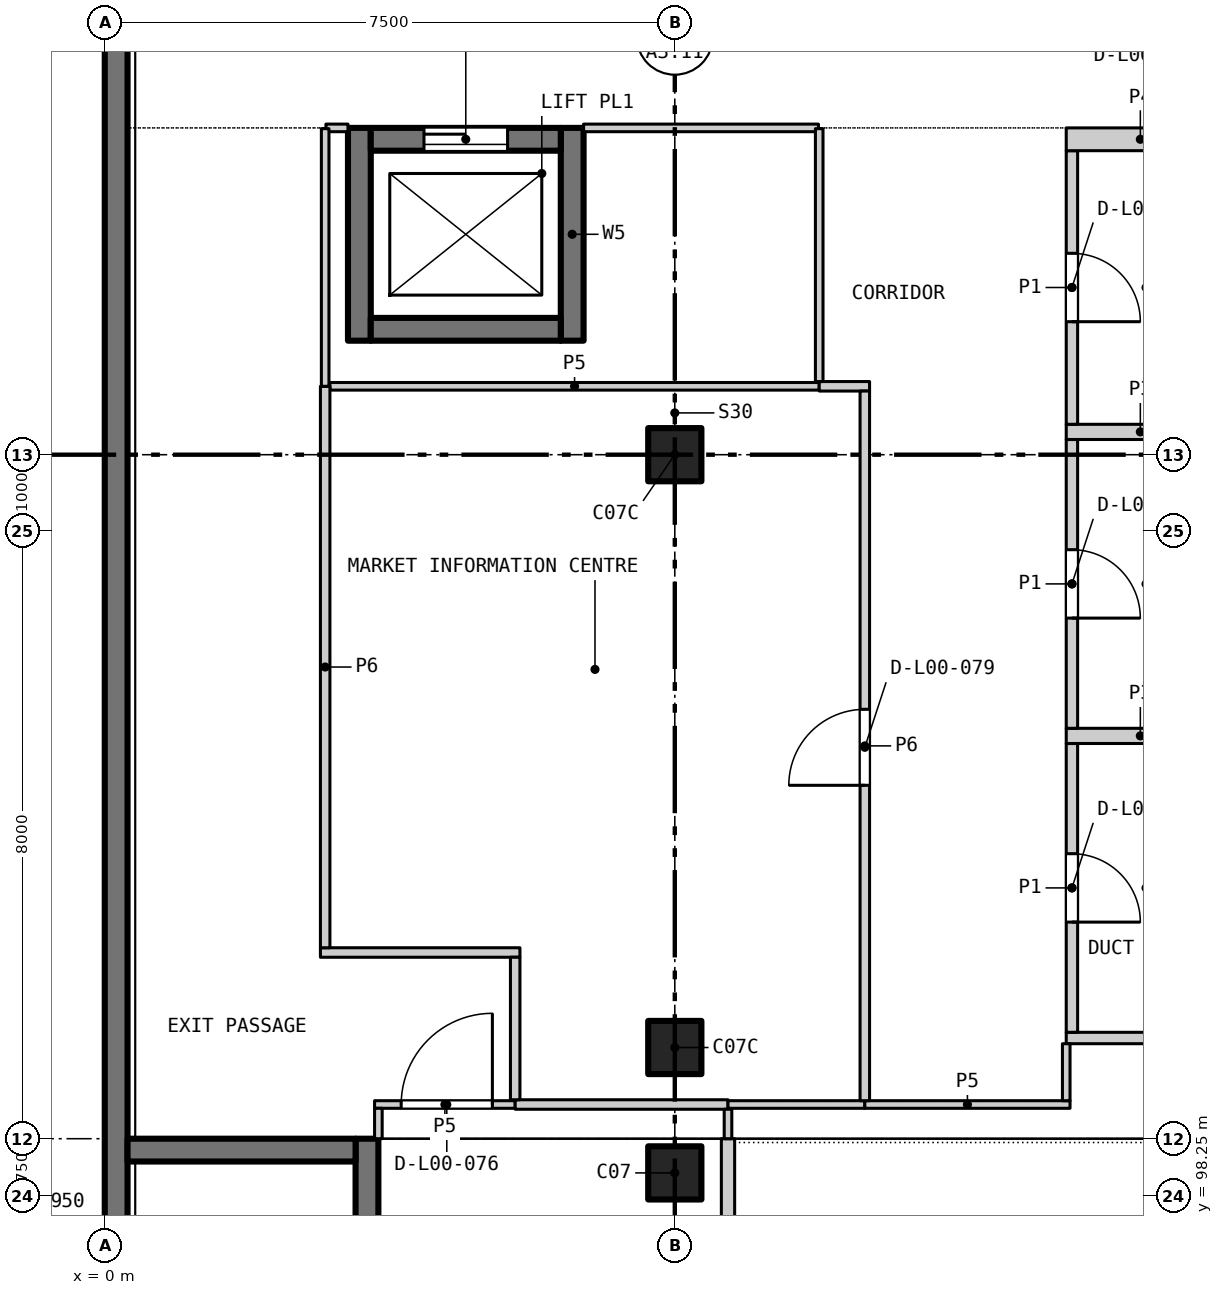
"""IFC4 building model, lengths in metres.
Left out: names, types, materials, properties, quantities, classifications, styles, units other than length and angle.
Written with IfcOpenShell. Run it as: python <this file> out.ifc"""

import sys

from ifc_helpers import new_model, si_unit, direction, frame, frame_2d, origin, origin_2d, place, context, subcontext, project, spatial, rectangle, extrude, element, fill, save


model = new_model("IFC4")
c1 = context("Model", 3, precision=1e-05, world=origin(), true_north=direction((0.0, 1.0)))
c2 = subcontext(c1, "Body", "Model", "MODEL_VIEW")
j1 = project(units=[si_unit("LENGTHUNIT", "METRE"), si_unit("PLANEANGLEUNIT", "RADIAN")], contexts=[c1])
p1 = place(None, origin())
s1 = spatial("IfcSite", under=j1, at=p1, CompositionType="ELEMENT")
p2 = place(p1, origin())
s2 = spatial("IfcBuilding", under=s1, at=p2, CompositionType="ELEMENT")
p3 = place(p2, origin())
s3 = spatial("IfcBuildingStorey", under=s2, at=p3, CompositionType="ELEMENT", Elevation=0.0)
for number, where, z_axis, x_axis in (
    (1, (7.5, 98.55, 0.0), (0.0, 0.0, 1.0), (1.0, 0.0, 0.0)),
    (2, (7.5, 100.2, 0.0), (0.0, 0.0, 1.0), (1.0, 0.0, 0.0)),
    (3, (7.5, 108.0, 0.0), (0.0, 0.0, 1.0), (1.0, 0.0, 0.0)),
):
    element("IfcColumn", number, at=place(p3, frame(where, z_axis=z_axis, x_axis=x_axis)), inside=s3, PredefinedType="COLUMN", context=c2, shape_type="SweptSolid", body=[
        extrude(rectangle(XDim=0.7, YDim=0.7, at=origin_2d()), origin(), (0.0, 0.0, 1.0), 6.0),
    ])
p4 = place(p3, frame((0.15, 18.0, 0.0), z_axis=(0.0, 0.0, 1.0), x_axis=(0.0, 1.0, 0.0)))
e4 = element("IfcWall", 4, at=p4, inside=s3, PredefinedType="SHEAR", context=c2, shape_type="SweptSolid", body=[
    extrude(rectangle(XDim=108.0, YDim=0.3, at=frame_2d((54.0, 0.0))), origin(), (0.0, 0.0, 1.0), 6.0),
])
p5 = place(p3, frame((3.45, 91.2, 0.0), z_axis=(0.0, 0.0, 1.0), x_axis=(0.0, 1.0, 0.0)))
e5 = element("IfcWall", 5, at=p5, inside=s3, PredefinedType="SHEAR", context=c2, shape_type="SweptSolid", body=[
    extrude(rectangle(XDim=7.8, YDim=0.3, at=frame_2d((3.9, 0.0))), origin(), (0.0, 0.0, 1.0), 6.0),
])
p6 = place(p5, frame((0.75, 0.0, 0.0)))
e6 = element("IfcOpeningElement", 6, at=p6, cuts=e5, PredefinedType="OPENING", context=c2, shape_type="SweptSolid", body=[
    extrude(rectangle(XDim=1.1, YDim=2.1, at=frame_2d((0.55, 1.05))), frame((0.0, 0.16, 0.0), z_axis=(0.0, -1.0, 0.0), x_axis=(1.0, 0.0, 0.0)), (0.0, 0.0, 1.0), 0.32),
])
p7 = place(p3, frame((0.3, 98.85, 0.0), z_axis=(0.0, 0.0, 1.0), x_axis=(1.0, 0.0, 0.0)))
e7 = element("IfcWall", 7, at=p7, inside=s3, PredefinedType="SHEAR", context=c2, shape_type="SweptSolid", body=[
    extrude(rectangle(XDim=3.0, YDim=0.3, at=frame_2d((1.5, 0.0))), origin(), (0.0, 0.0, 1.0), 6.0),
])
for number, where, z_axis, x_axis in (
    (8, (3.35, 109.5, 0.0), (0.0, 0.0, 1.0), (0.0, 1.0, 0.0)),
    (9, (6.15, 109.5, 0.0), (0.0, 0.0, 1.0), (0.0, 1.0, 0.0)),
):
    element("IfcWall", number, at=place(p3, frame(where, z_axis=z_axis, x_axis=x_axis)), inside=s3, PredefinedType="SHEAR", context=c2, shape_type="SweptSolid", body=[
        extrude(rectangle(XDim=2.8, YDim=0.3, at=frame_2d((1.4, 0.0))), origin(), (0.0, 0.0, 1.0), 6.0),
    ])
p8 = place(p3, frame((3.5, 109.65, 0.0), z_axis=(0.0, 0.0, 1.0), x_axis=(1.0, 0.0, 0.0)))
e10 = element("IfcWall", 10, at=p8, inside=s3, PredefinedType="SHEAR", context=c2, shape_type="SweptSolid", body=[
    extrude(rectangle(XDim=2.5, YDim=0.3, at=frame_2d((1.25, 0.0))), origin(), (0.0, 0.0, 1.0), 6.0),
])
p9 = place(p3, frame((3.5, 112.15, 0.0), z_axis=(0.0, 0.0, 1.0), x_axis=(1.0, 0.0, 0.0)))
e11 = element("IfcWall", 11, at=p9, inside=s3, PredefinedType="SHEAR", context=c2, shape_type="SweptSolid", body=[
    extrude(rectangle(XDim=2.5, YDim=0.3, at=frame_2d((1.25, 0.0))), origin(), (0.0, 0.0, 1.0), 6.0),
])
p10 = place(p9, frame((0.7, 0.0, 0.0)))
e12 = element("IfcOpeningElement", 12, at=p10, cuts=e11, PredefinedType="OPENING", context=c2, shape_type="SweptSolid", body=[
    extrude(rectangle(XDim=1.1, YDim=2.1, at=frame_2d((0.55, 1.05))), frame((0.0, 0.16, 0.0), z_axis=(0.0, -1.0, 0.0), x_axis=(1.0, 0.0, 0.0)), (0.0, 0.0, 1.0), 0.32),
])
p11 = place(p3, frame((12.65, 100.325, 0.0), z_axis=(0.0, 0.0, 1.0), x_axis=(1.0, 0.0, 0.0)))
e13 = element("IfcWall", 13, at=p11, inside=s3, PredefinedType="PARTITIONING", context=c2, shape_type="SweptSolid", body=[
    extrude(rectangle(XDim=1.95, YDim=0.15, at=frame_2d((0.975, 0.0))), origin(), (0.0, 0.0, 1.0), 5.7),
])
p12 = place(p3, frame((12.725, 100.4, 0.0), z_axis=(0.0, 0.0, 1.0), x_axis=(0.0, 1.0, 0.0)))
e14 = element("IfcWall", 14, at=p12, inside=s3, PredefinedType="PARTITIONING", context=c2, shape_type="SweptSolid", body=[
    extrude(rectangle(XDim=3.8, YDim=0.15, at=frame_2d((1.9, 0.0))), origin(), (0.0, 0.0, 1.0), 5.7),
])
p13 = place(p12, frame((1.45, 0.0, 0.0)))
e15 = element("IfcOpeningElement", 15, at=p13, cuts=e14, PredefinedType="OPENING", context=c2, shape_type="SweptSolid", body=[
    extrude(rectangle(XDim=0.9, YDim=2.1, at=frame_2d((0.45, 1.05))), frame((0.0, 0.085, 0.0), z_axis=(0.0, -1.0, 0.0), x_axis=(1.0, 0.0, 0.0)), (0.0, 0.0, 1.0), 0.17),
])
p14 = place(p3, frame((12.65, 104.3, 0.0), z_axis=(0.0, 0.0, 1.0), x_axis=(1.0, 0.0, 0.0)))
e16 = element("IfcWall", 16, at=p14, inside=s3, PredefinedType="PARTITIONING", context=c2, shape_type="SweptSolid", body=[
    extrude(rectangle(XDim=1.95, YDim=0.2, at=frame_2d((0.975, 0.0))), origin(), (0.0, 0.0, 1.0), 5.7),
])
p15 = place(p3, frame((12.725, 104.4, 0.0), z_axis=(0.0, 0.0, 1.0), x_axis=(0.0, 1.0, 0.0)))
e17 = element("IfcWall", 17, at=p15, inside=s3, PredefinedType="PARTITIONING", context=c2, shape_type="SweptSolid", body=[
    extrude(rectangle(XDim=3.8, YDim=0.15, at=frame_2d((1.9, 0.0))), origin(), (0.0, 0.0, 1.0), 5.7),
])
p16 = place(p15, frame((1.45, 0.0, 0.0)))
e18 = element("IfcOpeningElement", 18, at=p16, cuts=e17, PredefinedType="OPENING", context=c2, shape_type="SweptSolid", body=[
    extrude(rectangle(XDim=0.9, YDim=2.1, at=frame_2d((0.45, 1.05))), frame((0.0, 0.085, 0.0), z_axis=(0.0, -1.0, 0.0), x_axis=(1.0, 0.0, 0.0)), (0.0, 0.0, 1.0), 0.17),
])
p17 = place(p3, frame((12.65, 108.3, 0.0), z_axis=(0.0, 0.0, 1.0), x_axis=(1.0, 0.0, 0.0)))
e19 = element("IfcWall", 19, at=p17, inside=s3, PredefinedType="PARTITIONING", context=c2, shape_type="SweptSolid", body=[
    extrude(rectangle(XDim=1.95, YDim=0.2, at=frame_2d((0.975, 0.0))), origin(), (0.0, 0.0, 1.0), 5.7),
])
p18 = place(p3, frame((12.725, 108.4, 0.0), z_axis=(0.0, 0.0, 1.0), x_axis=(0.0, 1.0, 0.0)))
e20 = element("IfcWall", 20, at=p18, inside=s3, PredefinedType="PARTITIONING", context=c2, shape_type="SweptSolid", body=[
    extrude(rectangle(XDim=3.6, YDim=0.15, at=frame_2d((1.8, 0.0))), origin(), (0.0, 0.0, 1.0), 5.7),
])
p19 = place(p18, frame((1.35, 0.0, 0.0)))
e21 = element("IfcOpeningElement", 21, at=p19, cuts=e20, PredefinedType="OPENING", context=c2, shape_type="SweptSolid", body=[
    extrude(rectangle(XDim=0.9, YDim=2.1, at=frame_2d((0.45, 1.05))), frame((0.0, 0.085, 0.0), z_axis=(0.0, -1.0, 0.0), x_axis=(1.0, 0.0, 0.0)), (0.0, 0.0, 1.0), 0.17),
])
p20 = place(p3, frame((12.65, 112.15, 0.0), z_axis=(0.0, 0.0, 1.0), x_axis=(1.0, 0.0, 0.0)))
e22 = element("IfcWall", 22, at=p20, inside=s3, PredefinedType="PARTITIONING", context=c2, shape_type="SweptSolid", body=[
    extrude(rectangle(XDim=1.95, YDim=0.3, at=frame_2d((0.975, 0.0))), origin(), (0.0, 0.0, 1.0), 5.7),
])
p21 = place(p3, frame((3.55, 99.45, 0.0), z_axis=(0.0, 0.0, 1.0), x_axis=(1.0, 0.0, 0.0)))
e23 = element("IfcWall", 23, at=p21, inside=s3, PredefinedType="PARTITIONING", context=c2, shape_type="SweptSolid", body=[
    extrude(rectangle(XDim=1.85, YDim=0.1, at=frame_2d((0.925, 0.0))), origin(), (0.0, 0.0, 1.0), 5.7),
])
p22 = place(p21, frame((0.35, 0.0, 0.0)))
e24 = element("IfcOpeningElement", 24, at=p22, cuts=e23, PredefinedType="OPENING", context=c2, shape_type="SweptSolid", body=[
    extrude(rectangle(XDim=1.2, YDim=2.1, at=frame_2d((0.6, 1.05))), frame((0.0, 0.06, 0.0), z_axis=(0.0, -1.0, 0.0), x_axis=(1.0, 0.0, 0.0)), (0.0, 0.0, 1.0), 0.12),
])
p23 = place(p3, frame((5.4, 99.45, 0.0), z_axis=(0.0, 0.0, 1.0), x_axis=(1.0, 0.0, 0.0)))
e25 = element("IfcWall", 25, at=p23, inside=s3, PredefinedType="PARTITIONING", context=c2, shape_type="SweptSolid", body=[
    extrude(rectangle(XDim=2.8, YDim=0.125, at=frame_2d((1.4, 0.0))), origin(), (0.0, 0.0, 1.0), 5.7),
])
p24 = place(p3, frame((8.2, 99.45, 0.0), z_axis=(0.0, 0.0, 1.0), x_axis=(1.0, 0.0, 0.0)))
e26 = element("IfcWall", 26, at=p24, inside=s3, PredefinedType="PARTITIONING", context=c2, shape_type="SweptSolid", body=[
    extrude(rectangle(XDim=1.8, YDim=0.1, at=frame_2d((0.9, 0.0))), origin(), (0.0, 0.0, 1.0), 5.7),
])
p25 = place(p3, frame((10.0, 99.45, 0.0), z_axis=(0.0, 0.0, 1.0), x_axis=(1.0, 0.0, 0.0)))
e27 = element("IfcWall", 27, at=p25, inside=s3, PredefinedType="PARTITIONING", context=c2, shape_type="SweptSolid", body=[
    extrude(rectangle(XDim=2.7, YDim=0.1, at=frame_2d((1.35, 0.0))), origin(), (0.0, 0.0, 1.0), 5.7),
])
p26 = place(p3, frame((2.837, 101.45, 0.0), z_axis=(0.0, 0.0, 1.0), x_axis=(1.0, 0.0, 0.0)))
e28 = element("IfcWall", 28, at=p26, inside=s3, PredefinedType="PARTITIONING", context=c2, shape_type="SweptSolid", body=[
    extrude(rectangle(XDim=2.625, YDim=0.125, at=frame_2d((1.312, 0.0))), origin(), (0.0, 0.0, 1.0), 5.7),
])
p27 = place(p3, frame((2.962, 108.9, 0.0), z_axis=(0.0, 0.0, 1.0), x_axis=(1.0, 0.0, 0.0)))
e29 = element("IfcWall", 29, at=p27, inside=s3, PredefinedType="PARTITIONING", context=c2, shape_type="SweptSolid", body=[
    extrude(rectangle(XDim=6.438, YDim=0.1, at=frame_2d((3.219, 0.0))), origin(), (0.0, 0.0, 1.0), 5.7),
])
p28 = place(p3, frame((9.4, 108.9, 0.0), z_axis=(0.0, 0.0, 1.0), x_axis=(1.0, 0.0, 0.0)))
e30 = element("IfcWall", 30, at=p28, inside=s3, PredefinedType="PARTITIONING", context=c2, shape_type="SweptSolid", body=[
    extrude(rectangle(XDim=0.663, YDim=0.125, at=frame_2d((0.331, 0.0))), origin(), (0.0, 0.0, 1.0), 5.7),
])
p29 = place(p3, frame((2.91, 112.3, 0.0), z_axis=(0.0, 0.0, 1.0), x_axis=(1.0, 0.0, 0.0)))
e31 = element("IfcWall", 31, at=p29, inside=s3, PredefinedType="PARTITIONING", context=c2, shape_type="SweptSolid", body=[
    extrude(rectangle(XDim=0.29, YDim=0.1, at=frame_2d((0.145, 0.0))), origin(), (0.0, 0.0, 1.0), 5.7),
])
p30 = place(p3, frame((6.3, 112.3, 0.0), z_axis=(0.0, 0.0, 1.0), x_axis=(1.0, 0.0, 0.0)))
e32 = element("IfcWall", 32, at=p30, inside=s3, PredefinedType="PARTITIONING", context=c2, shape_type="SweptSolid", body=[
    extrude(rectangle(XDim=3.09, YDim=0.1, at=frame_2d((1.545, 0.0))), origin(), (0.0, 0.0, 1.0), 5.7),
])
p31 = place(p3, frame((2.9, 101.512, 0.0), z_axis=(0.0, 0.0, 1.0), x_axis=(0.0, 1.0, 0.0)))
e33 = element("IfcWall", 33, at=p31, inside=s3, PredefinedType="PARTITIONING", context=c2, shape_type="SweptSolid", body=[
    extrude(rectangle(XDim=7.387, YDim=0.125, at=frame_2d((3.694, 0.0))), origin(), (0.0, 0.0, 1.0), 5.7),
])
p32 = place(p3, frame((2.9, 108.9, 0.0), z_axis=(0.0, 0.0, 1.0), x_axis=(0.0, 1.0, 0.0)))
e34 = element("IfcWall", 34, at=p32, inside=s3, PredefinedType="PARTITIONING", context=c2, shape_type="SweptSolid", body=[
    extrude(rectangle(XDim=3.39, YDim=0.1, at=frame_2d((1.695, 0.0))), origin(), (0.0, 0.0, 1.0), 5.7),
])
p33 = place(p3, frame((3.6, 99.0, 0.0), z_axis=(0.0, 0.0, 1.0), x_axis=(0.0, 1.0, 0.0)))
e35 = element("IfcWall", 35, at=p33, inside=s3, PredefinedType="PARTITIONING", context=c2, shape_type="SweptSolid", body=[
    extrude(rectangle(XDim=0.4, YDim=0.1, at=frame_2d((0.2, 0.0))), origin(), (0.0, 0.0, 1.0), 5.7),
])
p34 = place(p3, frame((5.4, 99.512, 0.0), z_axis=(0.0, 0.0, 1.0), x_axis=(0.0, 1.0, 0.0)))
e36 = element("IfcWall", 36, at=p34, inside=s3, PredefinedType="PARTITIONING", context=c2, shape_type="SweptSolid", body=[
    extrude(rectangle(XDim=1.875, YDim=0.125, at=frame_2d((0.938, 0.0))), origin(), (0.0, 0.0, 1.0), 5.7),
])
p35 = place(p3, frame((8.2, 91.2, 0.0), z_axis=(0.0, 0.0, 1.0), x_axis=(0.0, 1.0, 0.0)))
e37 = element("IfcWall", 37, at=p35, inside=s3, PredefinedType="PARTITIONING", context=c2, shape_type="SweptSolid", body=[
    extrude(rectangle(XDim=7.8, YDim=0.175, at=frame_2d((3.9, 0.0))), origin(), (0.0, 0.0, 1.0), 5.8),
])
p36 = place(p35, frame((1.65, 0.0, 0.0)))
e38 = element("IfcOpeningElement", 38, at=p36, cuts=e37, PredefinedType="OPENING", context=c2, shape_type="SweptSolid", body=[
    extrude(rectangle(XDim=1.8, YDim=2.1, at=frame_2d((0.9, 1.05))), frame((0.0, 0.097, 0.0), z_axis=(0.0, -1.0, 0.0), x_axis=(1.0, 0.0, 0.0)), (0.0, 0.0, 1.0), 0.195),
])
p37 = place(p3, frame((8.2, 99.0, 0.0), z_axis=(0.0, 0.0, 1.0), x_axis=(0.0, 1.0, 0.0)))
e39 = element("IfcWall", 39, at=p37, inside=s3, PredefinedType="PARTITIONING", context=c2, shape_type="SweptSolid", body=[
    extrude(rectangle(XDim=0.387, YDim=0.1, at=frame_2d((0.194, 0.0))), origin(), (0.0, 0.0, 1.0), 5.8),
])
p38 = place(p3, frame((9.4, 108.962, 0.0), z_axis=(0.0, 0.0, 1.0), x_axis=(0.0, 1.0, 0.0)))
e40 = element("IfcWall", 40, at=p38, inside=s3, PredefinedType="PARTITIONING", context=c2, shape_type="SweptSolid", body=[
    extrude(rectangle(XDim=3.328, YDim=0.1, at=frame_2d((1.664, 0.0))), origin(), (0.0, 0.0, 1.0), 5.7),
])
p39 = place(p3, frame((10.0, 99.5, 0.0), z_axis=(0.0, 0.0, 1.0), x_axis=(0.0, 1.0, 0.0)))
e41 = element("IfcWall", 41, at=p39, inside=s3, PredefinedType="PARTITIONING", context=c2, shape_type="SweptSolid", body=[
    extrude(rectangle(XDim=9.337, YDim=0.125, at=frame_2d((4.669, 0.0))), origin(), (0.0, 0.0, 1.0), 5.7),
])
p40 = place(p39, frame((4.15, 0.0, 0.0)))
e42 = element("IfcOpeningElement", 42, at=p40, cuts=e41, PredefinedType="OPENING", context=c2, shape_type="SweptSolid", body=[
    extrude(rectangle(XDim=1.0, YDim=2.1, at=frame_2d((0.5, 1.05))), frame((0.0, 0.073, 0.0), z_axis=(0.0, -1.0, 0.0), x_axis=(1.0, 0.0, 0.0)), (0.0, 0.0, 1.0), 0.145),
])
p41 = place(p3, frame((12.65, 99.5, 0.0), z_axis=(0.0, 0.0, 1.0), x_axis=(0.0, 1.0, 0.0)))
e43 = element("IfcWall", 43, at=p41, inside=s3, PredefinedType="PARTITIONING", context=c2, shape_type="SweptSolid", body=[
    extrude(rectangle(XDim=0.75, YDim=0.1, at=frame_2d((0.375, 0.0))), origin(), (0.0, 0.0, 1.0), 5.7),
])
p42 = place(p22, origin())
e44 = element("IfcDoor", 44, at=p42, inside=s3, OperationType="SINGLE_SWING_RIGHT", PredefinedType="DOOR", context=c2, shape_type="SweptSolid", body=[
    extrude(rectangle(XDim=1.2, YDim=2.1, at=frame_2d((0.6, 1.05))), frame((0.0, 0.025, 0.0), z_axis=(0.0, -1.0, 0.0), x_axis=(1.0, 0.0, 0.0)), (0.0, 0.0, 1.0), 0.05),
])
fill(e24, e44)
p43 = place(p13, frame((0.9, 0.0, 0.0), z_axis=(0.0, 0.0, 1.0), x_axis=(-1.0, 0.0, 0.0)))
e45 = element("IfcDoor", 45, at=p43, inside=s3, OperationType="SINGLE_SWING_RIGHT", PredefinedType="DOOR", context=c2, shape_type="SweptSolid", body=[
    extrude(rectangle(XDim=0.9, YDim=2.1, at=frame_2d((0.45, 1.05))), frame((0.0, 0.025, 0.0), z_axis=(0.0, -1.0, 0.0), x_axis=(1.0, 0.0, 0.0)), (0.0, 0.0, 1.0), 0.05),
])
fill(e15, e45)
p44 = place(p40, origin())
e46 = element("IfcDoor", 46, at=p44, inside=s3, OperationType="SINGLE_SWING_LEFT", PredefinedType="DOOR", context=c2, shape_type="SweptSolid", body=[
    extrude(rectangle(XDim=1.0, YDim=2.1, at=frame_2d((0.5, 1.05))), frame((0.0, 0.025, 0.0), z_axis=(0.0, -1.0, 0.0), x_axis=(1.0, 0.0, 0.0)), (0.0, 0.0, 1.0), 0.05),
])
fill(e42, e46)
p45 = place(p16, frame((0.9, 0.0, 0.0), z_axis=(0.0, 0.0, 1.0), x_axis=(-1.0, 0.0, 0.0)))
e47 = element("IfcDoor", 47, at=p45, inside=s3, OperationType="SINGLE_SWING_RIGHT", PredefinedType="DOOR", context=c2, shape_type="SweptSolid", body=[
    extrude(rectangle(XDim=0.9, YDim=2.1, at=frame_2d((0.45, 1.05))), frame((0.0, 0.025, 0.0), z_axis=(0.0, -1.0, 0.0), x_axis=(1.0, 0.0, 0.0)), (0.0, 0.0, 1.0), 0.05),
])
fill(e18, e47)
p46 = place(p19, frame((0.9, 0.0, 0.0), z_axis=(0.0, 0.0, 1.0), x_axis=(-1.0, 0.0, 0.0)))
e48 = element("IfcDoor", 48, at=p46, inside=s3, OperationType="SINGLE_SWING_RIGHT", PredefinedType="DOOR", context=c2, shape_type="SweptSolid", body=[
    extrude(rectangle(XDim=0.9, YDim=2.1, at=frame_2d((0.45, 1.05))), frame((0.0, 0.025, 0.0), z_axis=(0.0, -1.0, 0.0), x_axis=(1.0, 0.0, 0.0)), (0.0, 0.0, 1.0), 0.05),
])
fill(e21, e48)
p47 = place(p10, origin())
e49 = element("IfcDoor", 49, at=p47, inside=s3, OperationType="SLIDING_TO_LEFT", PredefinedType="DOOR", context=c2, shape_type="SweptSolid", body=[
    extrude(rectangle(XDim=1.1, YDim=2.1, at=frame_2d((0.55, 1.05))), frame((0.0, 0.025, 0.0), z_axis=(0.0, -1.0, 0.0), x_axis=(1.0, 0.0, 0.0)), (0.0, 0.0, 1.0), 0.05),
])
fill(e12, e49)
save(model, sys.argv[1])
